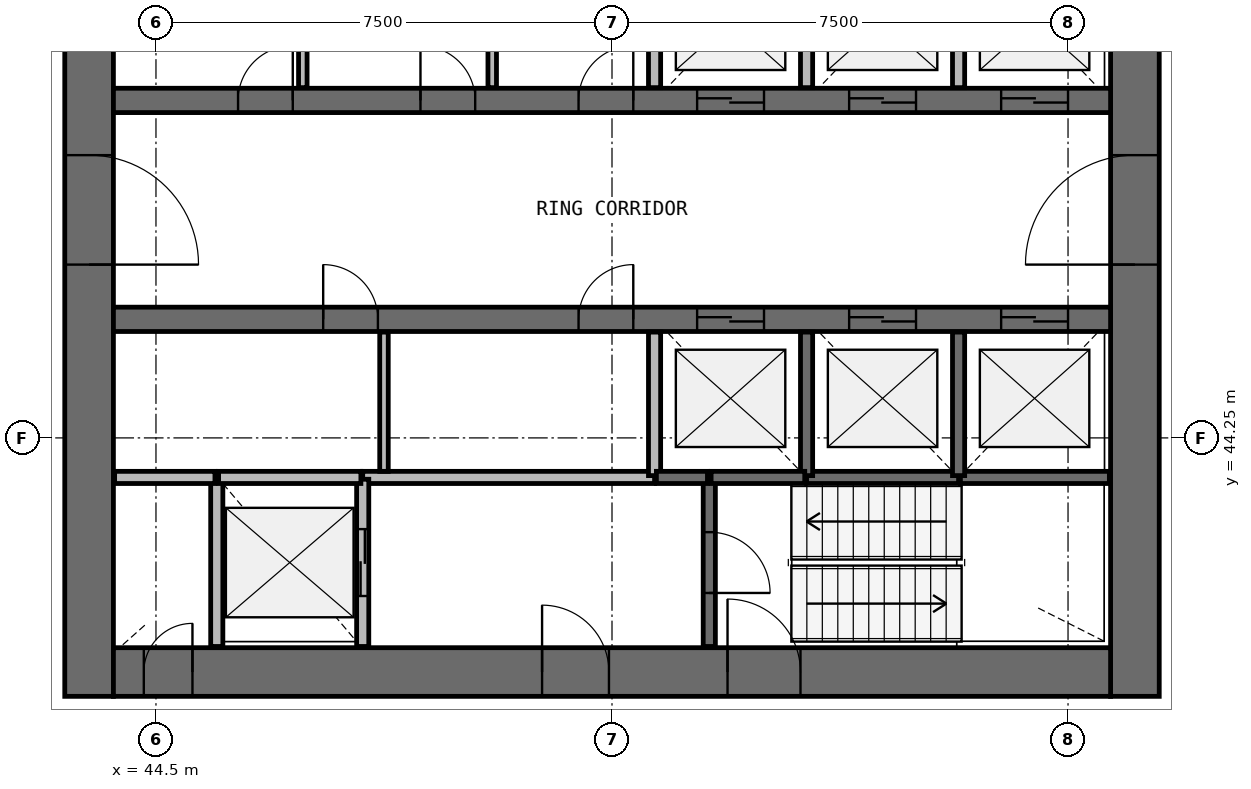
"""IFC4 building model, lengths in metres.
Left out: names, types, materials, properties, quantities, classifications, styles, units other than length and angle.
Written with IfcOpenShell. Run it as: python <this file> out.ifc"""

import sys

from ifc_helpers import new_model, si_unit, direction, frame, frame_2d, origin, place, context, subcontext, project, spatial, rectangle, extrude, source, transform, mapped, element, fill, save


model = new_model("IFC4")
c1 = context("Model", 3, precision=1e-05, world=origin(), true_north=direction((0.0, 1.0)))
c2 = subcontext(c1, "Body", "Model", "MODEL_VIEW")
j1 = project(units=[si_unit("LENGTHUNIT", "METRE"), si_unit("PLANEANGLEUNIT", "RADIAN")], contexts=[c1])
p1 = place(None, origin())
s1 = spatial("IfcSite", under=j1, at=p1, CompositionType="ELEMENT")
p2 = place(p1, origin())
s2 = spatial("IfcBuilding", under=s1, at=p2, CompositionType="ELEMENT")
p3 = place(p2, frame((0.0, 0.0, 172.1)))
s3 = spatial("IfcBuildingStorey", under=s2, at=p3, CompositionType="ELEMENT", Elevation=172.1)
p4 = place(p3, frame((60.6, 40.0, 0.0), z_axis=(0.0, 0.0, 1.0), x_axis=(0.0, 1.0, 0.0)))
e1 = element("IfcWall", 1, at=p4, inside=s3, PredefinedType="SHEAR", context=c2, shape_type="SweptSolid", body=[
    extrude(rectangle(XDim=16.0, YDim=0.8, at=frame_2d((8.0, 0.0))), origin(), (0.0, 0.0, 1.0), 3.9),
])
p5 = place(p4, frame((7.1, 0.0, 0.0)))
e2 = element("IfcOpeningElement", 2, at=p5, cuts=e1, PredefinedType="OPENING", context=c2, shape_type="SweptSolid", body=[
    extrude(rectangle(XDim=1.8, YDim=2.1, at=frame_2d((0.9, 1.05))), frame((0.0, 0.41, 0.0), z_axis=(0.0, -1.0, 0.0), x_axis=(1.0, 0.0, 0.0)), (0.0, 0.0, 1.0), 0.82),
])
p6 = place(p3, frame((43.4, 56.0, 0.0), z_axis=(0.0, 0.0, 1.0), x_axis=(0.0, -1.0, 0.0)))
e3 = element("IfcWall", 3, at=p6, inside=s3, PredefinedType="SHEAR", context=c2, shape_type="SweptSolid", body=[
    extrude(rectangle(XDim=16.0, YDim=0.8, at=frame_2d((8.0, 0.0))), origin(), (0.0, 0.0, 1.0), 3.9),
])
p7 = place(p6, frame((7.1, 0.0, 0.0)))
e4 = element("IfcOpeningElement", 4, at=p7, cuts=e3, PredefinedType="OPENING", context=c2, shape_type="SweptSolid", body=[
    extrude(rectangle(XDim=1.8, YDim=2.1, at=frame_2d((0.9, 1.05))), frame((0.0, 0.41, 0.0), z_axis=(0.0, -1.0, 0.0), x_axis=(1.0, 0.0, 0.0)), (0.0, 0.0, 1.0), 0.82),
])
p8 = place(p3, frame((43.8, 40.4, 0.0), z_axis=(0.0, 0.0, 1.0), x_axis=(1.0, 0.0, 0.0)))
e5 = element("IfcWall", 5, at=p8, inside=s3, PredefinedType="SHEAR", context=c2, shape_type="SweptSolid", body=[
    extrude(rectangle(XDim=16.4, YDim=0.8, at=frame_2d((8.2, 0.0))), origin(), (0.0, 0.0, 1.0), 3.9),
])
p9 = place(p8, frame((10.1, 0.0, 0.0)))
e6 = element("IfcOpeningElement", 6, at=p9, cuts=e5, PredefinedType="OPENING", context=c2, shape_type="SweptSolid", body=[
    extrude(rectangle(XDim=1.2, YDim=2.1, at=frame_2d((0.6, 1.05))), frame((0.0, 0.41, 0.0), z_axis=(0.0, -1.0, 0.0), x_axis=(1.0, 0.0, 0.0)), (0.0, 0.0, 1.0), 0.82),
])
p10 = place(p8, frame((7.05, 0.0, 0.0)))
e7 = element("IfcOpeningElement", 7, at=p10, cuts=e5, PredefinedType="OPENING", context=c2, shape_type="SweptSolid", body=[
    extrude(rectangle(XDim=1.1, YDim=2.1, at=frame_2d((0.55, 1.05))), frame((0.0, 0.41, 0.0), z_axis=(0.0, -1.0, 0.0), x_axis=(1.0, 0.0, 0.0)), (0.0, 0.0, 1.0), 0.82),
])
p11 = place(p8, frame((0.5, 0.0, 0.0)))
e8 = element("IfcOpeningElement", 8, at=p11, cuts=e5, PredefinedType="OPENING", context=c2, shape_type="SweptSolid", body=[
    extrude(rectangle(XDim=0.8, YDim=2.1, at=frame_2d((0.4, 1.05))), frame((0.0, 0.41, 0.0), z_axis=(0.0, -1.0, 0.0), x_axis=(1.0, 0.0, 0.0)), (0.0, 0.0, 1.0), 0.82),
])
p12 = place(p3, frame((43.8, 49.8, 0.0), z_axis=(0.0, 0.0, 1.0), x_axis=(1.0, 0.0, 0.0)))
e9 = element("IfcWall", 9, at=p12, inside=s3, PredefinedType="SHEAR", context=c2, shape_type="SweptSolid", body=[
    extrude(rectangle(XDim=16.4, YDim=0.4, at=frame_2d((8.2, 0.0))), origin(), (0.0, 0.0, 1.0), 3.9),
])
p13 = place(p12, frame((9.6, 0.0, 0.0)))
e10 = element("IfcOpeningElement", 10, at=p13, cuts=e9, PredefinedType="OPENING", context=c2, shape_type="SweptSolid", body=[
    extrude(rectangle(XDim=1.1, YDim=2.1, at=frame_2d((0.55, 1.05))), frame((0.0, 0.21, 0.0), z_axis=(0.0, -1.0, 0.0), x_axis=(1.0, 0.0, 0.0)), (0.0, 0.0, 1.0), 0.42),
])
p14 = place(p12, frame((12.1, 0.0, 0.0)))
e11 = element("IfcOpeningElement", 11, at=p14, cuts=e9, PredefinedType="OPENING", context=c2, shape_type="SweptSolid", body=[
    extrude(rectangle(XDim=1.1, YDim=2.1, at=frame_2d((0.55, 1.05))), frame((0.0, 0.21, 0.0), z_axis=(0.0, -1.0, 0.0), x_axis=(1.0, 0.0, 0.0)), (0.0, 0.0, 1.0), 0.42),
])
p15 = place(p12, frame((14.6, 0.0, 0.0)))
e12 = element("IfcOpeningElement", 12, at=p15, cuts=e9, PredefinedType="OPENING", context=c2, shape_type="SweptSolid", body=[
    extrude(rectangle(XDim=1.1, YDim=2.1, at=frame_2d((0.55, 1.05))), frame((0.0, 0.21, 0.0), z_axis=(0.0, -1.0, 0.0), x_axis=(1.0, 0.0, 0.0)), (0.0, 0.0, 1.0), 0.42),
])
p16 = place(p12, frame((2.05, 0.0, 0.0)))
e13 = element("IfcOpeningElement", 13, at=p16, cuts=e9, PredefinedType="OPENING", context=c2, shape_type="SweptSolid", body=[
    extrude(rectangle(XDim=0.9, YDim=2.1, at=frame_2d((0.45, 1.05))), frame((0.0, 0.21, 0.0), z_axis=(0.0, -1.0, 0.0), x_axis=(1.0, 0.0, 0.0)), (0.0, 0.0, 1.0), 0.42),
])
p17 = place(p12, frame((5.05, 0.0, 0.0)))
e14 = element("IfcOpeningElement", 14, at=p17, cuts=e9, PredefinedType="OPENING", context=c2, shape_type="SweptSolid", body=[
    extrude(rectangle(XDim=0.9, YDim=2.1, at=frame_2d((0.45, 1.05))), frame((0.0, 0.21, 0.0), z_axis=(0.0, -1.0, 0.0), x_axis=(1.0, 0.0, 0.0)), (0.0, 0.0, 1.0), 0.42),
])
p18 = place(p12, frame((7.65, 0.0, 0.0)))
e15 = element("IfcOpeningElement", 15, at=p18, cuts=e9, PredefinedType="OPENING", context=c2, shape_type="SweptSolid", body=[
    extrude(rectangle(XDim=0.9, YDim=2.1, at=frame_2d((0.45, 1.05))), frame((0.0, 0.21, 0.0), z_axis=(0.0, -1.0, 0.0), x_axis=(1.0, 0.0, 0.0)), (0.0, 0.0, 1.0), 0.42),
])
p19 = place(p3, frame((43.8, 46.2, 0.0), z_axis=(0.0, 0.0, 1.0), x_axis=(1.0, 0.0, 0.0)))
e16 = element("IfcWall", 16, at=p19, inside=s3, PredefinedType="SHEAR", context=c2, shape_type="SweptSolid", body=[
    extrude(rectangle(XDim=16.4, YDim=0.4, at=frame_2d((8.2, 0.0))), origin(), (0.0, 0.0, 1.0), 3.9),
])
p20 = place(p19, frame((9.6, 0.0, 0.0)))
e17 = element("IfcOpeningElement", 17, at=p20, cuts=e16, PredefinedType="OPENING", context=c2, shape_type="SweptSolid", body=[
    extrude(rectangle(XDim=1.1, YDim=2.1, at=frame_2d((0.55, 1.05))), frame((0.0, 0.21, 0.0), z_axis=(0.0, -1.0, 0.0), x_axis=(1.0, 0.0, 0.0)), (0.0, 0.0, 1.0), 0.42),
])
p21 = place(p19, frame((12.1, 0.0, 0.0)))
e18 = element("IfcOpeningElement", 18, at=p21, cuts=e16, PredefinedType="OPENING", context=c2, shape_type="SweptSolid", body=[
    extrude(rectangle(XDim=1.1, YDim=2.1, at=frame_2d((0.55, 1.05))), frame((0.0, 0.21, 0.0), z_axis=(0.0, -1.0, 0.0), x_axis=(1.0, 0.0, 0.0)), (0.0, 0.0, 1.0), 0.42),
])
p22 = place(p19, frame((14.6, 0.0, 0.0)))
e19 = element("IfcOpeningElement", 19, at=p22, cuts=e16, PredefinedType="OPENING", context=c2, shape_type="SweptSolid", body=[
    extrude(rectangle(XDim=1.1, YDim=2.1, at=frame_2d((0.55, 1.05))), frame((0.0, 0.21, 0.0), z_axis=(0.0, -1.0, 0.0), x_axis=(1.0, 0.0, 0.0)), (0.0, 0.0, 1.0), 0.42),
])
p23 = place(p19, frame((3.45, 0.0, 0.0)))
e20 = element("IfcOpeningElement", 20, at=p23, cuts=e16, PredefinedType="OPENING", context=c2, shape_type="SweptSolid", body=[
    extrude(rectangle(XDim=0.9, YDim=2.1, at=frame_2d((0.45, 1.05))), frame((0.0, 0.21, 0.0), z_axis=(0.0, -1.0, 0.0), x_axis=(1.0, 0.0, 0.0)), (0.0, 0.0, 1.0), 0.42),
])
p24 = place(p19, frame((7.65, 0.0, 0.0)))
e21 = element("IfcOpeningElement", 21, at=p24, cuts=e16, PredefinedType="OPENING", context=c2, shape_type="SweptSolid", body=[
    extrude(rectangle(XDim=0.9, YDim=2.1, at=frame_2d((0.45, 1.05))), frame((0.0, 0.21, 0.0), z_axis=(0.0, -1.0, 0.0), x_axis=(1.0, 0.0, 0.0)), (0.0, 0.0, 1.0), 0.42),
])
p25 = place(p3, frame((52.7, 43.6, 0.0), z_axis=(0.0, 0.0, 1.0), x_axis=(-1.0, 0.0, 0.0)))
e22 = element("IfcWall", 22, at=p25, inside=s3, PredefinedType="SOLIDWALL", context=c2, shape_type="SweptSolid", body=[
    extrude(rectangle(XDim=4.8, YDim=0.2, at=frame_2d((2.4, 0.0))), origin(), (0.0, 0.0, 1.0), 3.58),
])
p26 = place(p3, frame((45.5, 43.6, 0.0), z_axis=(0.0, 0.0, 1.0), x_axis=(0.0, -1.0, 0.0)))
e23 = element("IfcWall", 23, at=p26, inside=s3, PredefinedType="SOLIDWALL", context=c2, shape_type="SweptSolid", body=[
    extrude(rectangle(XDim=2.78, YDim=0.2, at=frame_2d((1.39, 0.0))), origin(), (0.0, 0.0, 1.0), 3.58),
])
p27 = place(p3, frame((47.9, 40.82, 0.0), z_axis=(0.0, 0.0, 1.0), x_axis=(0.0, 1.0, 0.0)))
e24 = element("IfcWall", 24, at=p27, inside=s3, PredefinedType="SOLIDWALL", context=c2, shape_type="SweptSolid", body=[
    extrude(rectangle(XDim=2.75, YDim=0.2, at=frame_2d((1.375, 0.0))), origin(), (0.0, 0.0, 1.0), 3.58),
])
p28 = place(p27, frame((0.83, 0.0, 0.0)))
e25 = element("IfcOpeningElement", 25, at=p28, cuts=e24, PredefinedType="OPENING", context=c2, shape_type="SweptSolid", body=[
    extrude(rectangle(XDim=1.1, YDim=2.1, at=frame_2d((0.55, 1.05))), frame((0.0, 0.11, 0.0), z_axis=(0.0, -1.0, 0.0), x_axis=(1.0, 0.0, 0.0)), (0.0, 0.0, 1.0), 0.22),
])
p29 = place(p3, frame((53.6, 43.6, 0.0), z_axis=(0.0, 0.0, 1.0), x_axis=(0.0, -1.0, 0.0)))
e26 = element("IfcWall", 26, at=p29, inside=s3, PredefinedType="SOLIDWALL", context=c2, shape_type="SweptSolid", body=[
    extrude(rectangle(XDim=2.78, YDim=0.2, at=frame_2d((1.39, 0.0))), origin(), (0.0, 0.0, 1.0), 3.58),
])
p30 = place(p29, frame((0.9, 0.0, 0.0)))
e27 = element("IfcOpeningElement", 27, at=p30, cuts=e26, PredefinedType="OPENING", context=c2, shape_type="SweptSolid", body=[
    extrude(rectangle(XDim=1.0, YDim=2.1, at=frame_2d((0.5, 1.05))), frame((0.0, 0.11, 0.0), z_axis=(0.0, -1.0, 0.0), x_axis=(1.0, 0.0, 0.0)), (0.0, 0.0, 1.0), 0.22),
])
p31 = place(p3, frame((55.2, 43.6, 0.0), z_axis=(0.0, 0.0, 1.0), x_axis=(1.0, 0.0, 0.0)))
e28 = element("IfcWall", 28, at=p31, inside=s3, PredefinedType="SOLIDWALL", context=c2, shape_type="SweptSolid", body=[
    extrude(rectangle(XDim=2.5, YDim=0.2, at=frame_2d((1.25, 0.0))), origin(), (0.0, 0.0, 1.0), 3.58),
])
p32 = place(p3, frame((57.73, 43.6, 0.0), z_axis=(0.0, 0.0, 1.0), x_axis=(1.0, 0.0, 0.0)))
e29 = element("IfcWall", 29, at=p32, inside=s3, PredefinedType="SOLIDWALL", context=c2, shape_type="SweptSolid", body=[
    extrude(rectangle(XDim=2.45, YDim=0.2, at=frame_2d((1.225, 0.0))), origin(), (0.0, 0.0, 1.0), 3.58),
])
p33 = place(p3, frame((47.87, 43.6, 0.0), z_axis=(0.0, 0.0, 1.0), x_axis=(-1.0, 0.0, 0.0)))
e30 = element("IfcWall", 30, at=p33, inside=s3, PredefinedType="SOLIDWALL", context=c2, shape_type="SweptSolid", body=[
    extrude(rectangle(XDim=2.34, YDim=0.2, at=frame_2d((1.17, 0.0))), origin(), (0.0, 0.0, 1.0), 3.58),
])
for number, where, z_axis, x_axis in (
    (31, (52.7, 45.99, 0.0), (0.0, 0.0, 1.0), (0.0, -1.0, 0.0)),
    (32, (52.7, 52.37, 0.0), (0.0, 0.0, 1.0), (0.0, -1.0, 0.0)),
    (33, (55.2, 43.63, 0.0), (0.0, 0.0, 1.0), (0.0, 1.0, 0.0)),
    (34, (55.2, 50.01, 0.0), (0.0, 0.0, 1.0), (0.0, 1.0, 0.0)),
    (35, (57.7, 43.63, 0.0), (0.0, 0.0, 1.0), (0.0, 1.0, 0.0)),
):
    element("IfcWall", number, at=place(p3, frame(where, z_axis=z_axis, x_axis=x_axis)), inside=s3, PredefinedType="SOLIDWALL", context=c2, shape_type="SweptSolid", body=[
        extrude(rectangle(XDim=2.36, YDim=0.2, at=frame_2d((1.18, 0.0))), origin(), (0.0, 0.0, 1.0), 3.58),
    ])
p34 = place(p3, frame((57.7, 50.01, 0.0), z_axis=(0.0, 0.0, 1.0), x_axis=(0.0, 1.0, 0.0)))
e36 = element("IfcWall", 36, at=p34, inside=s3, PredefinedType="SOLIDWALL", context=c2, shape_type="SweptSolid", body=[
    extrude(rectangle(XDim=2.39, YDim=0.2, at=frame_2d((1.195, 0.0))), origin(), (0.0, 0.0, 1.0), 3.58),
])
p35 = place(p3, frame((45.47, 43.6, 0.0), z_axis=(0.0, 0.0, 1.0), x_axis=(-1.0, 0.0, 0.0)))
e37 = element("IfcWall", 37, at=p35, inside=s3, PredefinedType="SOLIDWALL", context=c2, shape_type="SweptSolid", body=[
    extrude(rectangle(XDim=1.65, YDim=0.2, at=frame_2d((0.825, 0.0))), origin(), (0.0, 0.0, 1.0), 3.58),
])
p36 = place(p3, frame((53.63, 43.6, 0.0), z_axis=(0.0, 0.0, 1.0), x_axis=(1.0, 0.0, 0.0)))
e38 = element("IfcWall", 38, at=p36, inside=s3, PredefinedType="SOLIDWALL", context=c2, shape_type="SweptSolid", body=[
    extrude(rectangle(XDim=1.54, YDim=0.2, at=frame_2d((0.77, 0.0))), origin(), (0.0, 0.0, 1.0), 3.58),
])
p37 = place(p3, frame((52.73, 43.6, 0.0), z_axis=(0.0, 0.0, 1.0), x_axis=(1.0, 0.0, 0.0)))
e39 = element("IfcWall", 39, at=p37, inside=s3, PredefinedType="SOLIDWALL", context=c2, shape_type="SweptSolid", body=[
    extrude(rectangle(XDim=0.84, YDim=0.2, at=frame_2d((0.42, 0.0))), origin(), (0.0, 0.0, 1.0), 3.58),
])
for number, where, z_axis, x_axis in (
    (40, (46.915, 50.01, 0.0), (0.0, 0.0, 1.0), (0.0, 1.0, 0.0)),
    (41, (48.25, 43.7, 0.0), (0.0, 0.0, 1.0), (0.0, 1.0, 0.0)),
    (42, (50.03, 50.01, 0.0), (0.0, 0.0, 1.0), (0.0, 1.0, 0.0)),
):
    element("IfcWall", number, at=place(p3, frame(where, z_axis=z_axis, x_axis=x_axis)), inside=s3, PredefinedType="PARTITIONING", context=c2, shape_type="SweptSolid", body=[
        extrude(rectangle(XDim=2.29, YDim=0.14, at=frame_2d((1.145, 0.0))), origin(), (0.0, 0.0, 1.0), 2.88),
    ])
m1 = source(origin(), c2, "Body", "SweptSolid", [
    extrude(rectangle(XDim=1.8, YDim=2.1, at=frame_2d((0.9, 1.05))), frame((0.0, 0.025, 0.0), z_axis=(0.0, -1.0, 0.0), x_axis=(1.0, 0.0, 0.0)), (0.0, 0.0, 1.0), 0.05),
])
p38 = place(p7, origin())
e43 = element("IfcDoor", 43, at=p38, inside=s3, OperationType="SINGLE_SWING_RIGHT", PredefinedType="DOOR", context=c2, shape_type="MappedRepresentation", body=[
    mapped(m1, transform((0.0, 0.0, 0.0), scale=1.0)),
])
fill(e4, e43)
p39 = place(p5, origin())
e44 = element("IfcDoor", 44, at=p39, inside=s3, OperationType="SINGLE_SWING_LEFT", PredefinedType="DOOR", context=c2, shape_type="MappedRepresentation", body=[
    mapped(m1, transform((0.0, 0.0, 0.0), scale=1.0)),
])
fill(e2, e44)
m2 = source(origin(), c2, "Body", "SweptSolid", [
    extrude(rectangle(XDim=1.1, YDim=2.1, at=frame_2d((0.55, 1.05))), frame((0.0, 0.025, 0.0), z_axis=(0.0, -1.0, 0.0), x_axis=(1.0, 0.0, 0.0)), (0.0, 0.0, 1.0), 0.05),
])
p40 = place(p13, origin())
e45 = element("IfcDoor", 45, at=p40, inside=s3, OperationType="DOUBLE_DOOR_SLIDING", PredefinedType="USERDEFINED", context=c2, shape_type="MappedRepresentation", body=[
    mapped(m2, transform((0.0, 0.0, 0.0), scale=1.0)),
])
fill(e10, e45)
p41 = place(p14, origin())
e46 = element("IfcDoor", 46, at=p41, inside=s3, OperationType="DOUBLE_DOOR_SLIDING", PredefinedType="USERDEFINED", context=c2, shape_type="MappedRepresentation", body=[
    mapped(m2, transform((0.0, 0.0, 0.0), scale=1.0)),
])
fill(e11, e46)
p42 = place(p15, origin())
e47 = element("IfcDoor", 47, at=p42, inside=s3, OperationType="DOUBLE_DOOR_SLIDING", PredefinedType="USERDEFINED", context=c2, shape_type="MappedRepresentation", body=[
    mapped(m2, transform((0.0, 0.0, 0.0), scale=1.0)),
])
fill(e12, e47)
p43 = place(p20, origin())
e48 = element("IfcDoor", 48, at=p43, inside=s3, OperationType="DOUBLE_DOOR_SLIDING", PredefinedType="USERDEFINED", context=c2, shape_type="MappedRepresentation", body=[
    mapped(m2, transform((0.0, 0.0, 0.0), scale=1.0)),
])
fill(e17, e48)
p44 = place(p21, origin())
e49 = element("IfcDoor", 49, at=p44, inside=s3, OperationType="DOUBLE_DOOR_SLIDING", PredefinedType="USERDEFINED", context=c2, shape_type="MappedRepresentation", body=[
    mapped(m2, transform((0.0, 0.0, 0.0), scale=1.0)),
])
fill(e18, e49)
p45 = place(p22, origin())
e50 = element("IfcDoor", 50, at=p45, inside=s3, OperationType="DOUBLE_DOOR_SLIDING", PredefinedType="USERDEFINED", context=c2, shape_type="MappedRepresentation", body=[
    mapped(m2, transform((0.0, 0.0, 0.0), scale=1.0)),
])
fill(e19, e50)
p46 = place(p28, origin())
e51 = element("IfcDoor", 51, at=p46, inside=s3, OperationType="DOUBLE_DOOR_SLIDING", PredefinedType="USERDEFINED", context=c2, shape_type="MappedRepresentation", body=[
    mapped(m2, transform((0.0, 0.0, 0.0), scale=1.0)),
])
fill(e25, e51)
m3 = source(origin(), c2, "Body", "SweptSolid", [
    extrude(rectangle(XDim=1.2, YDim=2.1, at=frame_2d((0.6, 1.05))), frame((0.0, 0.025, 0.0), z_axis=(0.0, -1.0, 0.0), x_axis=(1.0, 0.0, 0.0)), (0.0, 0.0, 1.0), 0.05),
])
p47 = place(p9, origin())
e52 = element("IfcDoor", 52, at=p47, inside=s3, OperationType="SINGLE_SWING_LEFT", PredefinedType="DOOR", context=c2, shape_type="MappedRepresentation", body=[
    mapped(m3, transform((0.0, 0.0, 0.0), scale=1.0)),
])
fill(e6, e52)
m4 = source(origin(), c2, "Body", "SweptSolid", [
    extrude(rectangle(XDim=1.0, YDim=2.1, at=frame_2d((0.5, 1.05))), frame((0.0, 0.025, 0.0), z_axis=(0.0, -1.0, 0.0), x_axis=(1.0, 0.0, 0.0)), (0.0, 0.0, 1.0), 0.05),
])
p48 = place(p30, origin())
e53 = element("IfcDoor", 53, at=p48, inside=s3, OperationType="SINGLE_SWING_RIGHT", PredefinedType="DOOR", context=c2, shape_type="MappedRepresentation", body=[
    mapped(m4, transform((0.0, 0.0, 0.0), scale=1.0)),
])
fill(e27, e53)
m5 = source(origin(), c2, "Body", "SweptSolid", [
    extrude(rectangle(XDim=1.1, YDim=2.1, at=frame_2d((0.55, 1.05))), frame((0.0, 0.025, 0.0), z_axis=(0.0, -1.0, 0.0), x_axis=(1.0, 0.0, 0.0)), (0.0, 0.0, 1.0), 0.05),
])
p49 = place(p10, origin())
e54 = element("IfcDoor", 54, at=p49, inside=s3, OperationType="SINGLE_SWING_LEFT", PredefinedType="DOOR", context=c2, shape_type="MappedRepresentation", body=[
    mapped(m5, transform((0.0, 0.0, 0.0), scale=1.0)),
])
fill(e7, e54)
m6 = source(origin(), c2, "Body", "SweptSolid", [
    extrude(rectangle(XDim=0.8, YDim=2.1, at=frame_2d((0.4, 1.05))), frame((0.0, 0.025, 0.0), z_axis=(0.0, -1.0, 0.0), x_axis=(1.0, 0.0, 0.0)), (0.0, 0.0, 1.0), 0.05),
])
p50 = place(p11, origin())
e55 = element("IfcDoor", 55, at=p50, inside=s3, OperationType="SINGLE_SWING_RIGHT", PredefinedType="DOOR", context=c2, shape_type="MappedRepresentation", body=[
    mapped(m6, transform((0.0, 0.0, 0.0), scale=1.0)),
])
fill(e8, e55)
m7 = source(origin(), c2, "Body", "SweptSolid", [
    extrude(rectangle(XDim=0.9, YDim=2.1, at=frame_2d((0.45, 1.05))), frame((0.0, 0.025, 0.0), z_axis=(0.0, -1.0, 0.0), x_axis=(1.0, 0.0, 0.0)), (0.0, 0.0, 1.0), 0.05),
])
p51 = place(p16, origin())
e56 = element("IfcDoor", 56, at=p51, inside=s3, OperationType="SINGLE_SWING_RIGHT", PredefinedType="DOOR", context=c2, shape_type="MappedRepresentation", body=[
    mapped(m7, transform((0.0, 0.0, 0.0), scale=1.0)),
])
fill(e13, e56)
p52 = place(p17, origin())
e57 = element("IfcDoor", 57, at=p52, inside=s3, OperationType="SINGLE_SWING_LEFT", PredefinedType="DOOR", context=c2, shape_type="MappedRepresentation", body=[
    mapped(m7, transform((0.0, 0.0, 0.0), scale=1.0)),
])
fill(e14, e57)
p53 = place(p18, origin())
e58 = element("IfcDoor", 58, at=p53, inside=s3, OperationType="SINGLE_SWING_RIGHT", PredefinedType="DOOR", context=c2, shape_type="MappedRepresentation", body=[
    mapped(m7, transform((0.0, 0.0, 0.0), scale=1.0)),
])
fill(e15, e58)
p54 = place(p23, origin())
e59 = element("IfcDoor", 59, at=p54, inside=s3, OperationType="SINGLE_SWING_LEFT", PredefinedType="DOOR", context=c2, shape_type="MappedRepresentation", body=[
    mapped(m7, transform((0.0, 0.0, 0.0), scale=1.0)),
])
fill(e20, e59)
p55 = place(p24, origin())
e60 = element("IfcDoor", 60, at=p55, inside=s3, OperationType="SINGLE_SWING_RIGHT", PredefinedType="DOOR", context=c2, shape_type="MappedRepresentation", body=[
    mapped(m7, transform((0.0, 0.0, 0.0), scale=1.0)),
])
fill(e21, e60)
save(model, sys.argv[1])
